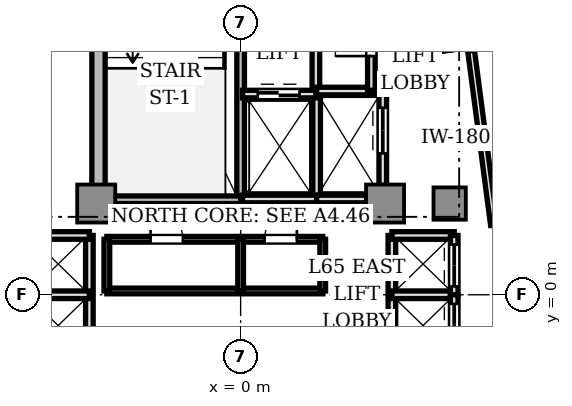
"""IFC4 building model, lengths in metres.
Left out: names, types, materials, properties, quantities, classifications, styles, units other than length and angle.
Written with IfcOpenShell. Run it as: python <this file> out.ifc"""

import sys

from ifc_helpers import new_model, si_unit, direction, frame, frame_2d, origin, origin_2d, place, context, subcontext, project, spatial, rectangle, extrude, source, transform, mapped, element, fill, save


model = new_model("IFC4")
c1 = context("Model", 3, precision=1e-05, world=origin(), true_north=direction((0.0, 1.0)))
c2 = subcontext(c1, "Body", "Model", "MODEL_VIEW")
j1 = project(units=[si_unit("LENGTHUNIT", "METRE"), si_unit("PLANEANGLEUNIT", "RADIAN")], contexts=[c1])
p1 = place(None, origin())
s1 = spatial("IfcSite", under=j1, at=p1, CompositionType="ELEMENT")
p2 = place(p1, origin())
s2 = spatial("IfcBuilding", under=s1, at=p2, CompositionType="ELEMENT")
p3 = place(p2, frame((0.0, 0.0, 234.45)))
s3 = spatial("IfcBuildingStorey", under=s2, at=p3, CompositionType="ELEMENT", Elevation=234.45)
p4 = place(p3, frame((-3.74, 2.85, 0.0), z_axis=(0.0, 0.0, 1.0), x_axis=(0.0, 1.0, 0.0)))
e1 = element("IfcWall", 1, at=p4, inside=s3, PredefinedType="SHEAR", context=c2, shape_type="SweptSolid", body=[
    extrude(rectangle(XDim=6.9, YDim=0.35, at=frame_2d((3.45, 0.0))), origin(), (0.0, 0.0, 1.0), 3.11),
])
m1 = source(origin(), c2, "Body", "SweptSolid", [
    extrude(rectangle(XDim=1.0, YDim=1.0, at=origin_2d()), origin(), (0.0, 0.0, 1.0), 3.11),
])
for number, where, z_axis, x_axis in (
    (2, (-3.8, 2.4, 0.0), (0.0, 0.0, 1.0), (1.0, 0.0, 0.0)),
    (3, (3.8, 2.4, 0.0), (0.0, 0.0, 1.0), (1.0, 0.0, 0.0)),
):
    element("IfcColumn", number, at=place(p3, frame(where, z_axis=z_axis, x_axis=x_axis)), inside=s3, PredefinedType="COLUMN", context=c2, shape_type="MappedRepresentation", body=[
        mapped(m1, transform((0.0, 0.0, 0.0), scale=1.0)),
    ])
m2 = source(origin(), c2, "Body", "SweptSolid", [
    extrude(rectangle(XDim=0.85, YDim=0.85, at=origin_2d()), origin(), (0.0, 0.0, 1.0), 3.11),
])
p5 = place(p3, frame((5.5, 2.4, 0.0), z_axis=(0.0, 0.0, 1.0), x_axis=(1.0, 0.0, 0.0)))
e4 = element("IfcColumn", 4, at=p5, inside=s3, PredefinedType="COLUMN", context=c2, shape_type="MappedRepresentation", body=[
    mapped(m2, transform((0.0, 0.0, 0.0), scale=1.0)),
])
p6 = place(p3, frame((4.846, 6.316, 0.0), z_axis=(0.0, 0.0, 1.0), x_axis=(-0.130576147498, 0.991438283356, 0.0)))
e5 = element("IfcWall", 5, at=p6, inside=s3, PredefinedType="STANDARD", context=c2, shape_type="SweptSolid", body=[
    extrude(rectangle(XDim=2.7, YDim=0.22, at=frame_2d((1.35, 0.0))), origin(), (0.0, 0.0, 1.0), 3.11),
])
p7 = place(p6, frame((1.4, 0.0, 0.0)))
e6 = element("IfcOpeningElement", 6, at=p7, cuts=e5, PredefinedType="OPENING", context=c2, shape_type="SweptSolid", body=[
    extrude(rectangle(XDim=1.0, YDim=2.2, at=frame_2d((0.5, 1.1))), frame((0.0, 0.12, 0.0), z_axis=(0.0, -1.0, 0.0), x_axis=(1.0, 0.0, 0.0)), (0.0, 0.0, 1.0), 0.24),
])
p8 = place(p3, frame((0.0, 2.5, 0.0), z_axis=(0.0, 0.0, 1.0), x_axis=(0.0, 1.0, 0.0)))
e7 = element("IfcWall", 7, at=p8, inside=s3, PredefinedType="SOLIDWALL", context=c2, shape_type="SweptSolid", body=[
    extrude(rectangle(XDim=7.68, YDim=0.2, at=frame_2d((3.84, 0.0))), origin(), (0.0, 0.0, 1.0), 3.11),
])
p9 = place(p8, frame((6.36, 0.0, 0.0)))
e8 = element("IfcOpeningElement", 8, at=p9, cuts=e7, PredefinedType="OPENING", context=c2, shape_type="SweptSolid", body=[
    extrude(rectangle(XDim=1.1, YDim=2.15, at=frame_2d((0.55, 1.075))), frame((0.0, 0.11, 0.0), z_axis=(0.0, -1.0, 0.0), x_axis=(1.0, 0.0, 0.0)), (0.0, 0.0, 1.0), 0.22),
])
p10 = place(p3, frame((-3.72, 2.5, 0.0), z_axis=(0.0, 0.0, 1.0), x_axis=(1.0, 0.0, 0.0)))
e9 = element("IfcWall", 9, at=p10, inside=s3, PredefinedType="SOLIDWALL", context=c2, shape_type="SweptSolid", body=[
    extrude(rectangle(XDim=3.72, YDim=0.2, at=frame_2d((1.86, 0.0))), origin(), (0.0, 0.0, 1.0), 3.11),
])
p11 = place(p3, frame((1.98, 5.32, 0.0), z_axis=(0.0, 0.0, 1.0), x_axis=(0.0, 1.0, 0.0)))
e10 = element("IfcWall", 10, at=p11, inside=s3, PredefinedType="SOLIDWALL", context=c2, shape_type="SweptSolid", body=[
    extrude(rectangle(XDim=4.66, YDim=0.2, at=frame_2d((2.33, 0.0))), origin(), (0.0, 0.0, 1.0), 2.66),
])
p12 = place(p11, frame((3.04, 0.0, 0.0)))
e11 = element("IfcOpeningElement", 11, at=p12, cuts=e10, PredefinedType="OPENING", context=c2, shape_type="SweptSolid", body=[
    extrude(rectangle(XDim=0.85, YDim=2.1, at=frame_2d((0.425, 1.05))), frame((0.0, 0.11, 0.0), z_axis=(0.0, -1.0, 0.0), x_axis=(1.0, 0.0, 0.0)), (0.0, 0.0, 1.0), 0.22),
])
p13 = place(p3, frame((2.0, 2.5, 0.0), z_axis=(0.0, 0.0, 1.0), x_axis=(0.0, 1.0, 0.0)))
e12 = element("IfcWall", 12, at=p13, inside=s3, PredefinedType="SOLIDWALL", context=c2, shape_type="SweptSolid", body=[
    extrude(rectangle(XDim=2.78, YDim=0.2, at=frame_2d((1.39, 0.0))), origin(), (0.0, 0.0, 1.0), 2.66),
])
p14 = place(p3, frame((0.05, 2.52, 0.0), z_axis=(0.0, 0.0, 1.0), x_axis=(1.0, 0.0, 0.0)))
e13 = element("IfcWall", 13, at=p14, inside=s3, PredefinedType="SOLIDWALL", context=c2, shape_type="SweptSolid", body=[
    extrude(rectangle(XDim=1.95, YDim=0.2, at=frame_2d((0.975, 0.0))), origin(), (0.0, 0.0, 1.0), 2.66),
])
p15 = place(p3, frame((0.05, 5.28, 0.0), z_axis=(0.0, 0.0, 1.0), x_axis=(1.0, 0.0, 0.0)))
e14 = element("IfcWall", 14, at=p15, inside=s3, PredefinedType="SOLIDWALL", context=c2, shape_type="SweptSolid", body=[
    extrude(rectangle(XDim=1.93, YDim=0.2, at=frame_2d((0.965, 0.0))), origin(), (0.0, 0.0, 1.0), 2.66),
])
p16 = place(p15, frame((0.4, 0.0, 0.0)))
e15 = element("IfcOpeningElement", 15, at=p16, cuts=e14, PredefinedType="OPENING", context=c2, shape_type="SweptSolid", body=[
    extrude(rectangle(XDim=1.1, YDim=2.2, at=frame_2d((0.55, 1.1))), frame((0.0, 0.11, 0.0), z_axis=(0.0, -1.0, 0.0), x_axis=(1.0, 0.0, 0.0)), (0.0, 0.0, 1.0), 0.22),
])
p17 = place(p3, frame((2.0, 2.52, 0.0), z_axis=(0.0, 0.0, 1.0), x_axis=(1.0, 0.0, 0.0)))
e16 = element("IfcWall", 16, at=p17, inside=s3, PredefinedType="SOLIDWALL", context=c2, shape_type="SweptSolid", body=[
    extrude(rectangle(XDim=1.32, YDim=0.2, at=frame_2d((0.66, 0.0))), origin(), (0.0, 0.0, 1.0), 2.66),
])
p18 = place(p3, frame((2.0, 5.36, 0.0), z_axis=(0.0, 0.0, 1.0), x_axis=(1.0, 0.0, 0.0)))
e17 = element("IfcWall", 17, at=p18, inside=s3, PredefinedType="SOLIDWALL", context=c2, shape_type="SweptSolid", body=[
    extrude(rectangle(XDim=1.74, YDim=0.2, at=frame_2d((0.87, 0.0))), origin(), (0.0, 0.0, 1.0), 2.66),
])
p19 = place(p3, frame((3.74, 2.88, 0.0), z_axis=(0.0, 0.0, 1.0), x_axis=(0.0, 1.0, 0.0)))
e18 = element("IfcWall", 18, at=p19, inside=s3, PredefinedType="SOLIDWALL", context=c2, shape_type="SweptSolid", body=[
    extrude(rectangle(XDim=2.48, YDim=0.2, at=frame_2d((1.24, 0.0))), origin(), (0.0, 0.0, 1.0), 2.66),
])
p20 = place(p19, frame((0.84, 0.0, 0.0)))
e19 = element("IfcOpeningElement", 19, at=p20, cuts=e18, PredefinedType="OPENING", context=c2, shape_type="SweptSolid", body=[
    extrude(rectangle(XDim=1.2, YDim=2.2, at=frame_2d((0.6, 1.1))), frame((0.0, 0.11, 0.0), z_axis=(0.0, -1.0, 0.0), x_axis=(1.0, 0.0, 0.0)), (0.0, 0.0, 1.0), 0.22),
])
p21 = place(p3, frame((3.98, -1.56, 0.0), z_axis=(0.0, 0.0, 1.0), x_axis=(0.0, 1.0, 0.0)))
e20 = element("IfcWall", 20, at=p21, inside=s3, PredefinedType="SOLIDWALL", context=c2, shape_type="SweptSolid", body=[
    extrude(rectangle(XDim=3.12, YDim=0.2, at=frame_2d((1.56, 0.0))), origin(), (0.0, 0.0, 1.0), 2.33),
])
for number, where, z_axis, x_axis in (
    (21, (3.98, 1.56, 0.0), (0.0, 0.0, 1.0), (1.0, 0.0, 0.0)),
    (22, (3.98, 0.0, 0.0), (0.0, 0.0, 1.0), (1.0, 0.0, 0.0)),
):
    element("IfcWall", number, at=place(p3, frame(where, z_axis=z_axis, x_axis=x_axis)), inside=s3, PredefinedType="SOLIDWALL", context=c2, shape_type="SweptSolid", body=[
        extrude(rectangle(XDim=1.64, YDim=0.2, at=frame_2d((0.82, 0.0))), origin(), (0.0, 0.0, 1.0), 2.66),
    ])
p22 = place(p3, frame((5.62, 0.0, 0.0), z_axis=(0.0, 0.0, 1.0), x_axis=(0.0, 1.0, 0.0)))
e23 = element("IfcWall", 23, at=p22, inside=s3, PredefinedType="SOLIDWALL", context=c2, shape_type="SweptSolid", body=[
    extrude(rectangle(XDim=1.56, YDim=0.2, at=frame_2d((0.78, 0.0))), origin(), (0.0, 0.0, 1.0), 2.66),
])
p23 = place(p22, frame((0.22, 0.0, 0.0)))
e24 = element("IfcOpeningElement", 24, at=p23, cuts=e23, PredefinedType="OPENING", context=c2, shape_type="SweptSolid", body=[
    extrude(rectangle(XDim=1.1, YDim=2.2, at=frame_2d((0.55, 1.1))), frame((0.0, 0.11, 0.0), z_axis=(0.0, -1.0, 0.0), x_axis=(1.0, 0.0, 0.0)), (0.0, 0.0, 1.0), 0.22),
])
p24 = place(p3, frame((5.62, -1.56, 0.0), z_axis=(0.0, 0.0, 1.0), x_axis=(0.0, 1.0, 0.0)))
e25 = element("IfcWall", 25, at=p24, inside=s3, PredefinedType="SOLIDWALL", context=c2, shape_type="SweptSolid", body=[
    extrude(rectangle(XDim=1.56, YDim=0.2, at=frame_2d((0.78, 0.0))), origin(), (0.0, 0.0, 1.0), 2.66),
])
p25 = place(p24, frame((0.22, 0.0, 0.0)))
e26 = element("IfcOpeningElement", 26, at=p25, cuts=e25, PredefinedType="OPENING", context=c2, shape_type="SweptSolid", body=[
    extrude(rectangle(XDim=1.1, YDim=2.2, at=frame_2d((0.55, 1.1))), frame((0.0, 0.11, 0.0), z_axis=(0.0, -1.0, 0.0), x_axis=(1.0, 0.0, 0.0)), (0.0, 0.0, 1.0), 0.22),
])
p26 = place(p3, frame((-3.98, -1.56, 0.0), z_axis=(0.0, 0.0, 1.0), x_axis=(0.0, 1.0, 0.0)))
e27 = element("IfcWall", 27, at=p26, inside=s3, PredefinedType="SOLIDWALL", context=c2, shape_type="SweptSolid", body=[
    extrude(rectangle(XDim=3.12, YDim=0.2, at=frame_2d((1.56, 0.0))), origin(), (0.0, 0.0, 1.0), 2.33),
])
for number, where, z_axis, x_axis in (
    (28, (-5.62, 1.56, 0.0), (0.0, 0.0, 1.0), (1.0, 0.0, 0.0)),
    (29, (-5.62, 0.0, 0.0), (0.0, 0.0, 1.0), (1.0, 0.0, 0.0)),
):
    element("IfcWall", number, at=place(p3, frame(where, z_axis=z_axis, x_axis=x_axis)), inside=s3, PredefinedType="SOLIDWALL", context=c2, shape_type="SweptSolid", body=[
        extrude(rectangle(XDim=1.64, YDim=0.2, at=frame_2d((0.82, 0.0))), origin(), (0.0, 0.0, 1.0), 2.66),
    ])
p27 = place(p3, frame((3.44, 5.38, 0.0), z_axis=(0.0, 0.0, 1.0), x_axis=(0.0, 1.0, 0.0)))
e30 = element("IfcWall", 30, at=p27, inside=s3, PredefinedType="SOLIDWALL", context=c2, shape_type="SweptSolid", body=[
    extrude(rectangle(XDim=2.77, YDim=0.2, at=frame_2d((1.385, 0.0))), origin(), (0.0, 0.0, 1.0), 2.66),
])
p28 = place(p27, frame((0.9, 0.0, 0.0)))
e31 = element("IfcOpeningElement", 31, at=p28, cuts=e30, PredefinedType="OPENING", context=c2, shape_type="SweptSolid", body=[
    extrude(rectangle(XDim=0.95, YDim=2.15, at=frame_2d((0.475, 1.075))), frame((0.0, 0.11, 0.0), z_axis=(0.0, -1.0, 0.0), x_axis=(1.0, 0.0, 0.0)), (0.0, 0.0, 1.0), 0.22),
])
p29 = place(p3, frame((-3.52, 0.1, 0.0), z_axis=(0.0, 0.0, 1.0), x_axis=(1.0, 0.0, 0.0)))
e32 = element("IfcWall", 32, at=p29, inside=s3, PredefinedType="PARTITIONING", context=c2, shape_type="SweptSolid", body=[
    extrude(rectangle(XDim=5.68, YDim=0.15, at=frame_2d((2.84, 0.0))), origin(), (0.0, 0.0, 1.0), 2.66),
])
p30 = place(p3, frame((-3.52, 1.46, 0.0), z_axis=(0.0, 0.0, 1.0), x_axis=(1.0, 0.0, 0.0)))
e33 = element("IfcWall", 33, at=p30, inside=s3, PredefinedType="PARTITIONING", context=c2, shape_type="SweptSolid", body=[
    extrude(rectangle(XDim=5.68, YDim=0.15, at=frame_2d((2.84, 0.0))), origin(), (0.0, 0.0, 1.0), 2.66),
])
p31 = place(p30, frame((1.15, 0.0, 0.0)))
e34 = element("IfcOpeningElement", 34, at=p31, cuts=e33, PredefinedType="OPENING", context=c2, shape_type="SweptSolid", body=[
    extrude(rectangle(XDim=0.85, YDim=2.1, at=frame_2d((0.425, 1.05))), frame((0.0, 0.085, 0.0), z_axis=(0.0, -1.0, 0.0), x_axis=(1.0, 0.0, 0.0)), (0.0, 0.0, 1.0), 0.17),
])
p32 = place(p30, frame((4.15, 0.0, 0.0)))
e35 = element("IfcOpeningElement", 35, at=p32, cuts=e33, PredefinedType="OPENING", context=c2, shape_type="SweptSolid", body=[
    extrude(rectangle(XDim=0.85, YDim=2.1, at=frame_2d((0.425, 1.05))), frame((0.0, 0.085, 0.0), z_axis=(0.0, -1.0, 0.0), x_axis=(1.0, 0.0, 0.0)), (0.0, 0.0, 1.0), 0.17),
])
p33 = place(p3, frame((-3.52, 0.1, 0.0), z_axis=(0.0, 0.0, 1.0), x_axis=(0.0, 1.0, 0.0)))
e36 = element("IfcWall", 36, at=p33, inside=s3, PredefinedType="PARTITIONING", context=c2, shape_type="SweptSolid", body=[
    extrude(rectangle(XDim=1.36, YDim=0.15, at=frame_2d((0.68, 0.0))), origin(), (0.0, 0.0, 1.0), 2.33),
])
for number, where, z_axis, x_axis in (
    (37, (2.16, 0.1, 0.0), (0.0, 0.0, 1.0), (0.0, 1.0, 0.0)),
    (38, (0.0, 0.1, 0.0), (0.0, 0.0, 1.0), (0.0, 1.0, 0.0)),
):
    element("IfcWall", number, at=place(p3, frame(where, z_axis=z_axis, x_axis=x_axis)), inside=s3, PredefinedType="PARTITIONING", context=c2, shape_type="SweptSolid", body=[
        extrude(rectangle(XDim=1.36, YDim=0.15, at=frame_2d((0.68, 0.0))), origin(), (0.0, 0.0, 1.0), 2.66),
    ])
p34 = place(p3, frame((6.667, 1.836, 0.0), z_axis=(0.0, 0.0, 1.0), x_axis=(-0.130536371683, 0.991443521169, 0.0)))
e39 = element("IfcWall", 39, at=p34, inside=s3, PredefinedType="PARTITIONING", context=c2, shape_type="SweptSolid", body=[
    extrude(rectangle(XDim=4.629, YDim=0.18, at=frame_2d((2.314, 0.0))), origin(), (0.0, 0.0, 1.0), 2.66),
])
m3 = source(origin(), c2, "Body", "SweptSolid", [
    extrude(rectangle(XDim=1.1, YDim=0.05, at=origin_2d()), origin(), (0.0, 0.0, 1.0), 2.2),
])
p35 = place(p16, frame((0.55, 0.0, 0.0)))
e40 = element("IfcDoor", 40, at=p35, inside=s3, OperationType="DOUBLE_DOOR_SLIDING", PredefinedType="DOOR", context=c2, shape_type="MappedRepresentation", body=[
    mapped(m3, transform((0.0, 0.0, 0.0), scale=1.0)),
])
fill(e15, e40)
m4 = source(origin(), c2, "Body", "SweptSolid", [
    extrude(rectangle(XDim=1.2, YDim=0.05, at=origin_2d()), origin(), (0.0, 0.0, 1.0), 2.2),
])
p36 = place(p20, frame((0.6, 0.0, 0.0)))
e41 = element("IfcDoor", 41, at=p36, inside=s3, OperationType="DOUBLE_DOOR_SLIDING", PredefinedType="DOOR", context=c2, shape_type="MappedRepresentation", body=[
    mapped(m4, transform((0.0, 0.0, 0.0), scale=1.0)),
])
fill(e19, e41)
p37 = place(p23, frame((0.55, 0.0, 0.0)))
e42 = element("IfcDoor", 42, at=p37, inside=s3, OperationType="DOUBLE_DOOR_SLIDING", PredefinedType="DOOR", context=c2, shape_type="MappedRepresentation", body=[
    mapped(m3, transform((0.0, 0.0, 0.0), scale=1.0)),
])
fill(e24, e42)
p38 = place(p25, frame((0.55, 0.0, 0.0)))
e43 = element("IfcDoor", 43, at=p38, inside=s3, OperationType="DOUBLE_DOOR_SLIDING", PredefinedType="DOOR", context=c2, shape_type="MappedRepresentation", body=[
    mapped(m3, transform((0.0, 0.0, 0.0), scale=1.0)),
])
fill(e26, e43)
m5 = source(origin(), c2, "Body", "SweptSolid", [
    extrude(rectangle(XDim=0.95, YDim=0.05, at=origin_2d()), origin(), (0.0, 0.0, 1.0), 2.15),
])
p39 = place(p28, frame((0.475, 0.0, 0.0)))
e44 = element("IfcDoor", 44, at=p39, inside=s3, OperationType="SINGLE_SWING_LEFT", PredefinedType="DOOR", context=c2, shape_type="MappedRepresentation", body=[
    mapped(m5, transform((0.0, 0.0, 0.0), scale=1.0)),
])
fill(e31, e44)
m6 = source(origin(), c2, "Body", "SweptSolid", [
    extrude(rectangle(XDim=0.85, YDim=0.05, at=origin_2d()), origin(), (0.0, 0.0, 1.0), 2.1),
])
p40 = place(p31, frame((0.425, 0.0, 0.0)))
e45 = element("IfcDoor", 45, at=p40, inside=s3, OperationType="SINGLE_SWING_LEFT", PredefinedType="DOOR", context=c2, shape_type="MappedRepresentation", body=[
    mapped(m6, transform((0.0, 0.0, 0.0), scale=1.0)),
])
fill(e34, e45)
p41 = place(p32, frame((0.425, 0.0, 0.0)))
e46 = element("IfcDoor", 46, at=p41, inside=s3, OperationType="SINGLE_SWING_RIGHT", PredefinedType="DOOR", context=c2, shape_type="MappedRepresentation", body=[
    mapped(m6, transform((0.0, 0.0, 0.0), scale=1.0)),
])
fill(e35, e46)
save(model, sys.argv[1])
